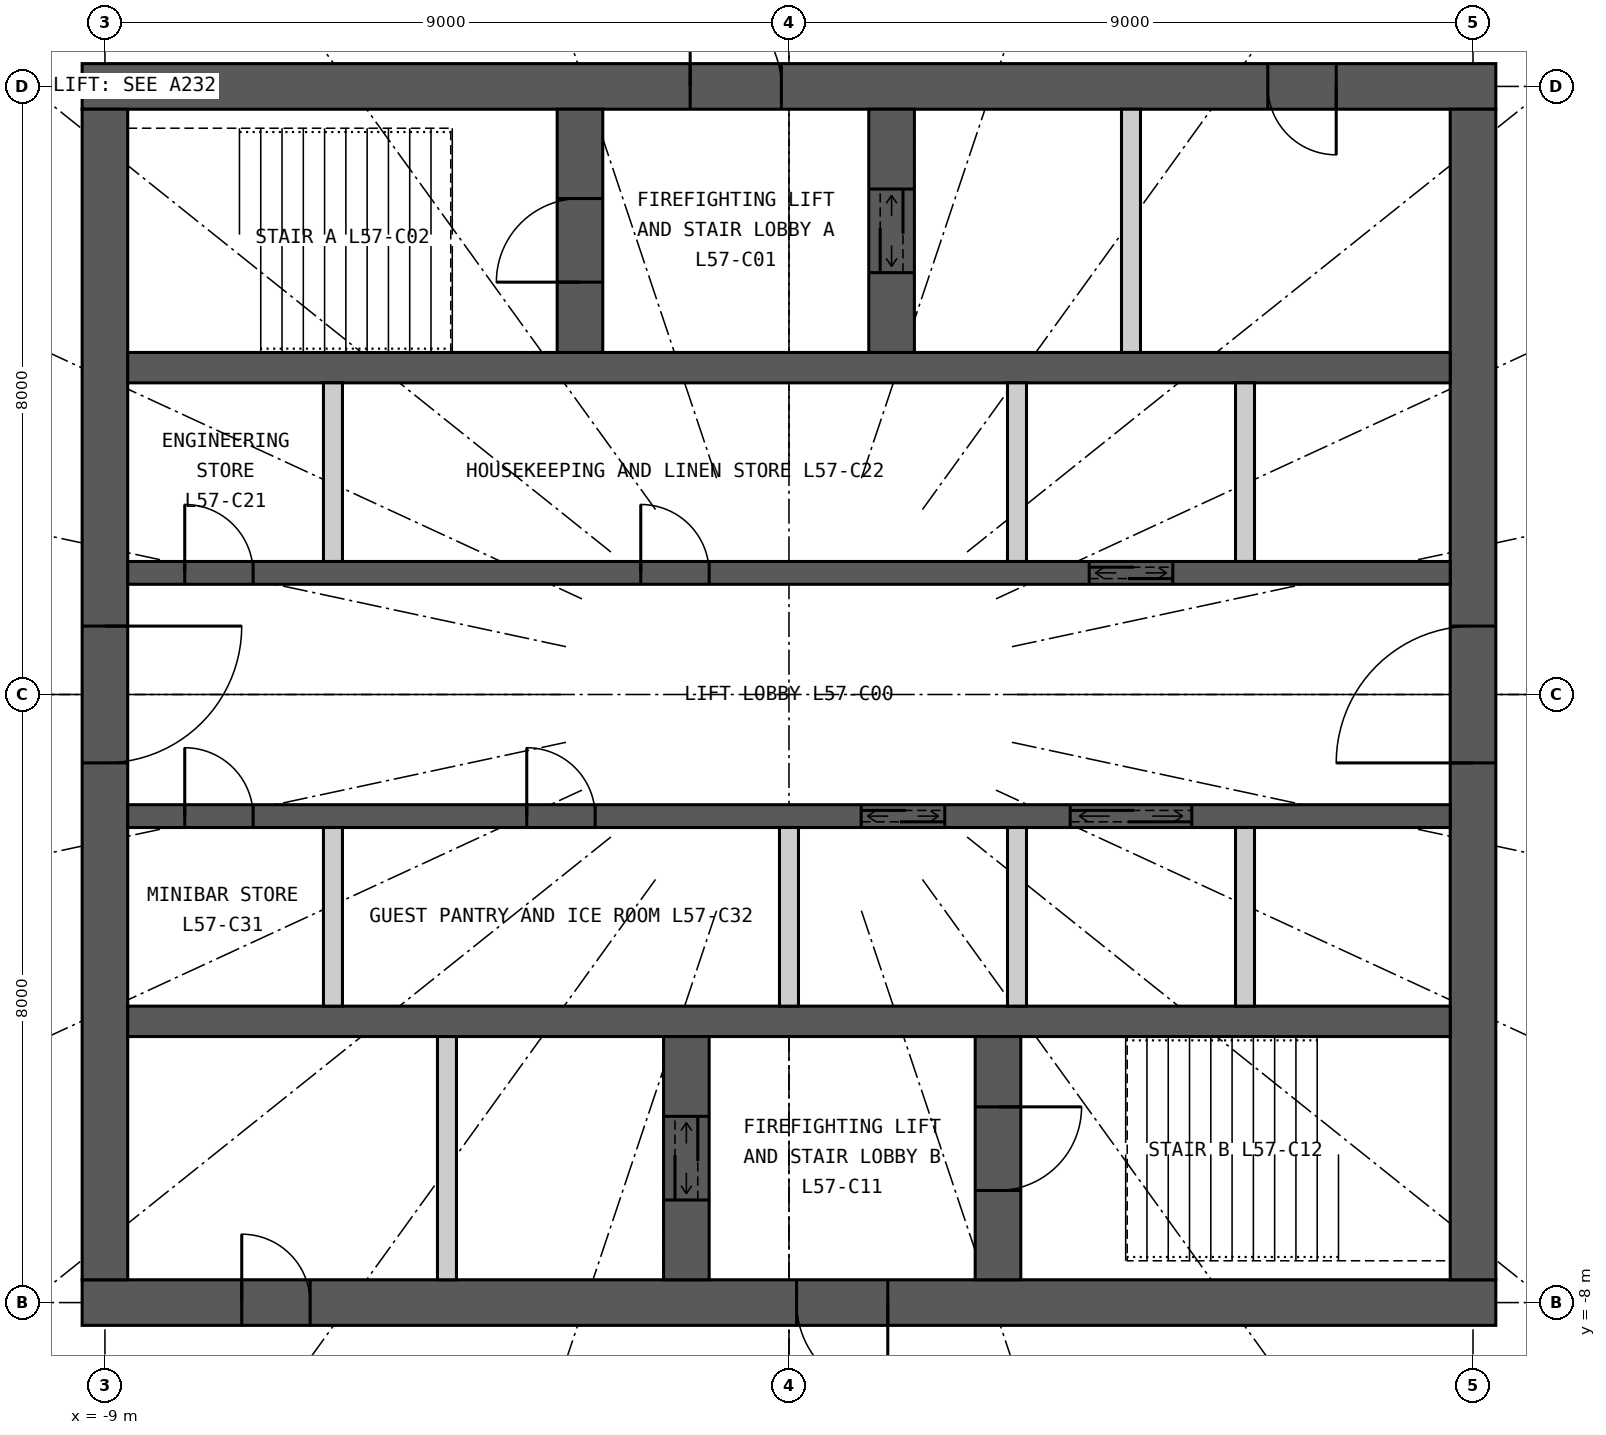
"""IFC4 building model, lengths in metres.
Left out: names, types, materials, properties, quantities, classifications, styles, units other than length and angle.
Written with IfcOpenShell. Run it as: python <this file> out.ifc"""

import sys

from ifc_helpers import new_model, si_unit, direction, frame, frame_2d, origin, place, context, subcontext, project, spatial, rectangle, extrude, element, fill, save


model = new_model("IFC4")
c1 = context("Model", 3, precision=1e-05, world=origin(), true_north=direction((0.0, 1.0)))
c2 = subcontext(c1, "Body", "Model", "MODEL_VIEW")
j1 = project(units=[si_unit("LENGTHUNIT", "METRE"), si_unit("PLANEANGLEUNIT", "RADIAN")], contexts=[c1])
p1 = place(None, origin())
s1 = spatial("IfcSite", under=j1, at=p1, CompositionType="ELEMENT")
p2 = place(p1, origin())
s2 = spatial("IfcBuilding", under=s1, at=p2, CompositionType="ELEMENT")
p3 = place(p2, frame((0.0, 0.0, 212.7)))
s3 = spatial("IfcBuildingStorey", under=s2, at=p3, CompositionType="ELEMENT", Elevation=212.7)
p4 = place(p3, frame((-9.3, 8.0, 0.0), z_axis=(0.0, 0.0, 1.0), x_axis=(1.0, 0.0, 0.0)))
e1 = element("IfcWall", 1, at=p4, inside=s3, PredefinedType="SHEAR", context=c2, shape_type="SweptSolid", body=[
    extrude(rectangle(XDim=18.6, YDim=0.6, at=frame_2d((9.3, 0.0))), origin(), (0.0, 0.0, 1.0), 3.3),
])
p5 = place(p4, frame((8.0, 0.0, 0.0)))
e2 = element("IfcOpeningElement", 2, at=p5, cuts=e1, PredefinedType="OPENING", context=c2, shape_type="SweptSolid", body=[
    extrude(rectangle(XDim=1.2, YDim=2.2, at=frame_2d((0.6, 1.1))), frame((0.0, 0.31, 0.0), z_axis=(0.0, -1.0, 0.0), x_axis=(1.0, 0.0, 0.0)), (0.0, 0.0, 1.0), 0.62),
])
p6 = place(p4, frame((15.6, 0.0, 0.0)))
e3 = element("IfcOpeningElement", 3, at=p6, cuts=e1, PredefinedType="OPENING", context=c2, shape_type="SweptSolid", body=[
    extrude(rectangle(XDim=0.9, YDim=2.2, at=frame_2d((0.45, 1.1))), frame((0.0, 0.31, 0.0), z_axis=(0.0, -1.0, 0.0), x_axis=(1.0, 0.0, 0.0)), (0.0, 0.0, 1.0), 0.62),
])
p7 = place(p3, frame((9.3, -8.0, 0.0), z_axis=(0.0, 0.0, 1.0), x_axis=(-1.0, 0.0, 0.0)))
e4 = element("IfcWall", 4, at=p7, inside=s3, PredefinedType="SHEAR", context=c2, shape_type="SweptSolid", body=[
    extrude(rectangle(XDim=18.6, YDim=0.6, at=frame_2d((9.3, 0.0))), origin(), (0.0, 0.0, 1.0), 3.3),
])
p8 = place(p7, frame((8.0, 0.0, 0.0)))
e5 = element("IfcOpeningElement", 5, at=p8, cuts=e4, PredefinedType="OPENING", context=c2, shape_type="SweptSolid", body=[
    extrude(rectangle(XDim=1.2, YDim=2.2, at=frame_2d((0.6, 1.1))), frame((0.0, 0.31, 0.0), z_axis=(0.0, -1.0, 0.0), x_axis=(1.0, 0.0, 0.0)), (0.0, 0.0, 1.0), 0.62),
])
p9 = place(p7, frame((15.6, 0.0, 0.0)))
e6 = element("IfcOpeningElement", 6, at=p9, cuts=e4, PredefinedType="OPENING", context=c2, shape_type="SweptSolid", body=[
    extrude(rectangle(XDim=0.9, YDim=2.2, at=frame_2d((0.45, 1.1))), frame((0.0, 0.31, 0.0), z_axis=(0.0, -1.0, 0.0), x_axis=(1.0, 0.0, 0.0)), (0.0, 0.0, 1.0), 0.62),
])
p10 = place(p3, frame((9.0, -7.7, 0.0), z_axis=(0.0, 0.0, 1.0), x_axis=(0.0, 1.0, 0.0)))
e7 = element("IfcWall", 7, at=p10, inside=s3, PredefinedType="SHEAR", context=c2, shape_type="SweptSolid", body=[
    extrude(rectangle(XDim=15.4, YDim=0.6, at=frame_2d((7.7, 0.0))), origin(), (0.0, 0.0, 1.0), 3.3),
])
p11 = place(p10, frame((6.8, 0.0, 0.0)))
e8 = element("IfcOpeningElement", 8, at=p11, cuts=e7, PredefinedType="OPENING", context=c2, shape_type="SweptSolid", body=[
    extrude(rectangle(XDim=1.8, YDim=2.2, at=frame_2d((0.9, 1.1))), frame((0.0, 0.31, 0.0), z_axis=(0.0, -1.0, 0.0), x_axis=(1.0, 0.0, 0.0)), (0.0, 0.0, 1.0), 0.62),
])
p12 = place(p3, frame((-9.0, 7.7, 0.0), z_axis=(0.0, 0.0, 1.0), x_axis=(0.0, -1.0, 0.0)))
e9 = element("IfcWall", 9, at=p12, inside=s3, PredefinedType="SHEAR", context=c2, shape_type="SweptSolid", body=[
    extrude(rectangle(XDim=15.4, YDim=0.6, at=frame_2d((7.7, 0.0))), origin(), (0.0, 0.0, 1.0), 3.3),
])
p13 = place(p12, frame((6.8, 0.0, 0.0)))
e10 = element("IfcOpeningElement", 10, at=p13, cuts=e9, PredefinedType="OPENING", context=c2, shape_type="SweptSolid", body=[
    extrude(rectangle(XDim=1.8, YDim=2.2, at=frame_2d((0.9, 1.1))), frame((0.0, 0.31, 0.0), z_axis=(0.0, -1.0, 0.0), x_axis=(1.0, 0.0, 0.0)), (0.0, 0.0, 1.0), 0.62),
])
p14 = place(p3, frame((-8.7, 4.3, 0.0), z_axis=(0.0, 0.0, 1.0), x_axis=(1.0, 0.0, 0.0)))
e11 = element("IfcWall", 11, at=p14, inside=s3, PredefinedType="SHEAR", context=c2, shape_type="SweptSolid", body=[
    extrude(rectangle(XDim=17.4, YDim=0.4, at=frame_2d((8.7, 0.0))), origin(), (0.0, 0.0, 1.0), 3.3),
])
p15 = place(p3, frame((-8.7, 1.6, 0.0), z_axis=(0.0, 0.0, 1.0), x_axis=(1.0, 0.0, 0.0)))
e12 = element("IfcWall", 12, at=p15, inside=s3, PredefinedType="SHEAR", context=c2, shape_type="SweptSolid", body=[
    extrude(rectangle(XDim=17.4, YDim=0.3, at=frame_2d((8.7, 0.0))), origin(), (0.0, 0.0, 1.0), 3.3),
])
p16 = place(p15, frame((12.65, 0.0, 0.0)))
e13 = element("IfcOpeningElement", 13, at=p16, cuts=e12, PredefinedType="OPENING", context=c2, shape_type="SweptSolid", body=[
    extrude(rectangle(XDim=1.1, YDim=2.2, at=frame_2d((0.55, 1.1))), frame((0.0, 0.16, 0.0), z_axis=(0.0, -1.0, 0.0), x_axis=(1.0, 0.0, 0.0)), (0.0, 0.0, 1.0), 0.32),
])
p17 = place(p15, frame((0.75, 0.0, 0.0)))
e14 = element("IfcOpeningElement", 14, at=p17, cuts=e12, PredefinedType="OPENING", context=c2, shape_type="SweptSolid", body=[
    extrude(rectangle(XDim=0.9, YDim=2.2, at=frame_2d((0.45, 1.1))), frame((0.0, 0.16, 0.0), z_axis=(0.0, -1.0, 0.0), x_axis=(1.0, 0.0, 0.0)), (0.0, 0.0, 1.0), 0.32),
])
p18 = place(p15, frame((6.75, 0.0, 0.0)))
e15 = element("IfcOpeningElement", 15, at=p18, cuts=e12, PredefinedType="OPENING", context=c2, shape_type="SweptSolid", body=[
    extrude(rectangle(XDim=0.9, YDim=2.2, at=frame_2d((0.45, 1.1))), frame((0.0, 0.16, 0.0), z_axis=(0.0, -1.0, 0.0), x_axis=(1.0, 0.0, 0.0)), (0.0, 0.0, 1.0), 0.32),
])
p19 = place(p3, frame((-8.7, -4.3, 0.0), z_axis=(0.0, 0.0, 1.0), x_axis=(1.0, 0.0, 0.0)))
e16 = element("IfcWall", 16, at=p19, inside=s3, PredefinedType="SHEAR", context=c2, shape_type="SweptSolid", body=[
    extrude(rectangle(XDim=17.4, YDim=0.4, at=frame_2d((8.7, 0.0))), origin(), (0.0, 0.0, 1.0), 3.3),
])
p20 = place(p3, frame((-8.7, -1.6, 0.0), z_axis=(0.0, 0.0, 1.0), x_axis=(1.0, 0.0, 0.0)))
e17 = element("IfcWall", 17, at=p20, inside=s3, PredefinedType="SHEAR", context=c2, shape_type="SweptSolid", body=[
    extrude(rectangle(XDim=17.4, YDim=0.3, at=frame_2d((8.7, 0.0))), origin(), (0.0, 0.0, 1.0), 3.3),
])
p21 = place(p20, frame((9.65, 0.0, 0.0)))
e18 = element("IfcOpeningElement", 18, at=p21, cuts=e17, PredefinedType="OPENING", context=c2, shape_type="SweptSolid", body=[
    extrude(rectangle(XDim=1.1, YDim=2.2, at=frame_2d((0.55, 1.1))), frame((0.0, 0.16, 0.0), z_axis=(0.0, -1.0, 0.0), x_axis=(1.0, 0.0, 0.0)), (0.0, 0.0, 1.0), 0.32),
])
p22 = place(p20, frame((12.4, 0.0, 0.0)))
e19 = element("IfcOpeningElement", 19, at=p22, cuts=e17, PredefinedType="OPENING", context=c2, shape_type="SweptSolid", body=[
    extrude(rectangle(XDim=1.6, YDim=2.4, at=frame_2d((0.8, 1.2))), frame((0.0, 0.16, 0.0), z_axis=(0.0, -1.0, 0.0), x_axis=(1.0, 0.0, 0.0)), (0.0, 0.0, 1.0), 0.32),
])
p23 = place(p20, frame((0.75, 0.0, 0.0)))
e20 = element("IfcOpeningElement", 20, at=p23, cuts=e17, PredefinedType="OPENING", context=c2, shape_type="SweptSolid", body=[
    extrude(rectangle(XDim=0.9, YDim=2.2, at=frame_2d((0.45, 1.1))), frame((0.0, 0.16, 0.0), z_axis=(0.0, -1.0, 0.0), x_axis=(1.0, 0.0, 0.0)), (0.0, 0.0, 1.0), 0.32),
])
p24 = place(p20, frame((5.25, 0.0, 0.0)))
e21 = element("IfcOpeningElement", 21, at=p24, cuts=e17, PredefinedType="OPENING", context=c2, shape_type="SweptSolid", body=[
    extrude(rectangle(XDim=0.9, YDim=2.2, at=frame_2d((0.45, 1.1))), frame((0.0, 0.16, 0.0), z_axis=(0.0, -1.0, 0.0), x_axis=(1.0, 0.0, 0.0)), (0.0, 0.0, 1.0), 0.32),
])
p25 = place(p3, frame((-2.75, 4.5, 0.0), z_axis=(0.0, 0.0, 1.0), x_axis=(0.0, 1.0, 0.0)))
e22 = element("IfcWall", 22, at=p25, inside=s3, PredefinedType="SHEAR", context=c2, shape_type="SweptSolid", body=[
    extrude(rectangle(XDim=3.2, YDim=0.6, at=frame_2d((1.6, 0.0))), origin(), (0.0, 0.0, 1.0), 3.3),
])
p26 = place(p25, frame((0.925, 0.0, 0.0)))
e23 = element("IfcOpeningElement", 23, at=p26, cuts=e22, PredefinedType="OPENING", context=c2, shape_type="SweptSolid", body=[
    extrude(rectangle(XDim=1.1, YDim=2.2, at=frame_2d((0.55, 1.1))), frame((0.0, 0.31, 0.0), z_axis=(0.0, -1.0, 0.0), x_axis=(1.0, 0.0, 0.0)), (0.0, 0.0, 1.0), 0.62),
])
p27 = place(p3, frame((1.35, 4.5, 0.0), z_axis=(0.0, 0.0, 1.0), x_axis=(0.0, 1.0, 0.0)))
e24 = element("IfcWall", 24, at=p27, inside=s3, PredefinedType="SHEAR", context=c2, shape_type="SweptSolid", body=[
    extrude(rectangle(XDim=3.2, YDim=0.6, at=frame_2d((1.6, 0.0))), origin(), (0.0, 0.0, 1.0), 3.3),
])
p28 = place(p27, frame((1.05, 0.0, 0.0)))
e25 = element("IfcOpeningElement", 25, at=p28, cuts=e24, PredefinedType="OPENING", context=c2, shape_type="SweptSolid", body=[
    extrude(rectangle(XDim=1.1, YDim=2.2, at=frame_2d((0.55, 1.1))), frame((0.0, 0.31, 0.0), z_axis=(0.0, -1.0, 0.0), x_axis=(1.0, 0.0, 0.0)), (0.0, 0.0, 1.0), 0.62),
])
p29 = place(p3, frame((4.5, 4.5, 0.0), z_axis=(0.0, 0.0, 1.0), x_axis=(0.0, 1.0, 0.0)))
e26 = element("IfcWall", 26, at=p29, inside=s3, PredefinedType="PARTITIONING", context=c2, shape_type="SweptSolid", body=[
    extrude(rectangle(XDim=3.2, YDim=0.25, at=frame_2d((1.6, 0.0))), origin(), (0.0, 0.0, 1.0), 3.3),
])
p30 = place(p3, frame((2.75, -7.7, 0.0), z_axis=(0.0, 0.0, 1.0), x_axis=(0.0, 1.0, 0.0)))
e27 = element("IfcWall", 27, at=p30, inside=s3, PredefinedType="SHEAR", context=c2, shape_type="SweptSolid", body=[
    extrude(rectangle(XDim=3.2, YDim=0.6, at=frame_2d((1.6, 0.0))), origin(), (0.0, 0.0, 1.0), 3.3),
])
p31 = place(p30, frame((1.175, 0.0, 0.0)))
e28 = element("IfcOpeningElement", 28, at=p31, cuts=e27, PredefinedType="OPENING", context=c2, shape_type="SweptSolid", body=[
    extrude(rectangle(XDim=1.1, YDim=2.2, at=frame_2d((0.55, 1.1))), frame((0.0, 0.31, 0.0), z_axis=(0.0, -1.0, 0.0), x_axis=(1.0, 0.0, 0.0)), (0.0, 0.0, 1.0), 0.62),
])
p32 = place(p3, frame((-1.35, -7.7, 0.0), z_axis=(0.0, 0.0, 1.0), x_axis=(0.0, 1.0, 0.0)))
e29 = element("IfcWall", 29, at=p32, inside=s3, PredefinedType="SHEAR", context=c2, shape_type="SweptSolid", body=[
    extrude(rectangle(XDim=3.2, YDim=0.6, at=frame_2d((1.6, 0.0))), origin(), (0.0, 0.0, 1.0), 3.3),
])
p33 = place(p32, frame((1.05, 0.0, 0.0)))
e30 = element("IfcOpeningElement", 30, at=p33, cuts=e29, PredefinedType="OPENING", context=c2, shape_type="SweptSolid", body=[
    extrude(rectangle(XDim=1.1, YDim=2.2, at=frame_2d((0.55, 1.1))), frame((0.0, 0.31, 0.0), z_axis=(0.0, -1.0, 0.0), x_axis=(1.0, 0.0, 0.0)), (0.0, 0.0, 1.0), 0.62),
])
p34 = place(p3, frame((-4.5, -7.7, 0.0), z_axis=(0.0, 0.0, 1.0), x_axis=(0.0, 1.0, 0.0)))
e31 = element("IfcWall", 31, at=p34, inside=s3, PredefinedType="PARTITIONING", context=c2, shape_type="SweptSolid", body=[
    extrude(rectangle(XDim=3.2, YDim=0.25, at=frame_2d((1.6, 0.0))), origin(), (0.0, 0.0, 1.0), 3.3),
])
for number, where, z_axis, x_axis in (
    (32, (-6.0, 1.75, 0.0), (0.0, 0.0, 1.0), (0.0, 1.0, 0.0)),
    (33, (3.0, 1.75, 0.0), (0.0, 0.0, 1.0), (0.0, 1.0, 0.0)),
    (34, (6.0, 1.75, 0.0), (0.0, 0.0, 1.0), (0.0, 1.0, 0.0)),
    (35, (-6.0, -4.1, 0.0), (0.0, 0.0, 1.0), (0.0, 1.0, 0.0)),
    (36, (0.0, -4.1, 0.0), (0.0, 0.0, 1.0), (0.0, 1.0, 0.0)),
    (37, (3.0, -4.1, 0.0), (0.0, 0.0, 1.0), (0.0, 1.0, 0.0)),
    (38, (6.0, -4.1, 0.0), (0.0, 0.0, 1.0), (0.0, 1.0, 0.0)),
):
    element("IfcWall", number, at=place(p3, frame(where, z_axis=z_axis, x_axis=x_axis)), inside=s3, PredefinedType="PARTITIONING", context=c2, shape_type="SweptSolid", body=[
        extrude(rectangle(XDim=2.35, YDim=0.25, at=frame_2d((1.175, 0.0))), origin(), (0.0, 0.0, 1.0), 3.3),
    ])
p35 = place(p5, origin())
e39 = element("IfcDoor", 39, at=p35, inside=s3, OperationType="SINGLE_SWING_LEFT", PredefinedType="DOOR", context=c2, shape_type="SweptSolid", body=[
    extrude(rectangle(XDim=1.2, YDim=2.2, at=frame_2d((0.6, 1.1))), frame((0.0, 0.025, 0.0), z_axis=(0.0, -1.0, 0.0), x_axis=(1.0, 0.0, 0.0)), (0.0, 0.0, 1.0), 0.05),
])
fill(e2, e39)
p36 = place(p26, origin())
e40 = element("IfcDoor", 40, at=p36, inside=s3, OperationType="SINGLE_SWING_LEFT", PredefinedType="DOOR", context=c2, shape_type="SweptSolid", body=[
    extrude(rectangle(XDim=1.1, YDim=2.2, at=frame_2d((0.55, 1.1))), frame((0.0, 0.025, 0.0), z_axis=(0.0, -1.0, 0.0), x_axis=(1.0, 0.0, 0.0)), (0.0, 0.0, 1.0), 0.05),
])
fill(e23, e40)
p37 = place(p28, origin())
e41 = element("IfcDoor", 41, at=p37, inside=s3, OperationType="DOUBLE_DOOR_SLIDING", PredefinedType="DOOR", context=c2, shape_type="SweptSolid", body=[
    extrude(rectangle(XDim=1.1, YDim=2.2, at=frame_2d((0.55, 1.1))), frame((0.0, 0.025, 0.0), z_axis=(0.0, -1.0, 0.0), x_axis=(1.0, 0.0, 0.0)), (0.0, 0.0, 1.0), 0.05),
])
fill(e25, e41)
p38 = place(p6, origin())
e42 = element("IfcDoor", 42, at=p38, inside=s3, OperationType="SINGLE_SWING_RIGHT", PredefinedType="DOOR", context=c2, shape_type="SweptSolid", body=[
    extrude(rectangle(XDim=0.9, YDim=2.2, at=frame_2d((0.45, 1.1))), frame((0.0, 0.025, 0.0), z_axis=(0.0, -1.0, 0.0), x_axis=(1.0, 0.0, 0.0)), (0.0, 0.0, 1.0), 0.05),
])
fill(e3, e42)
p39 = place(p8, origin())
e43 = element("IfcDoor", 43, at=p39, inside=s3, OperationType="SINGLE_SWING_LEFT", PredefinedType="DOOR", context=c2, shape_type="SweptSolid", body=[
    extrude(rectangle(XDim=1.2, YDim=2.2, at=frame_2d((0.6, 1.1))), frame((0.0, 0.025, 0.0), z_axis=(0.0, -1.0, 0.0), x_axis=(1.0, 0.0, 0.0)), (0.0, 0.0, 1.0), 0.05),
])
fill(e5, e43)
p40 = place(p31, origin())
e44 = element("IfcDoor", 44, at=p40, inside=s3, OperationType="SINGLE_SWING_RIGHT", PredefinedType="DOOR", context=c2, shape_type="SweptSolid", body=[
    extrude(rectangle(XDim=1.1, YDim=2.2, at=frame_2d((0.55, 1.1))), frame((0.0, 0.025, 0.0), z_axis=(0.0, -1.0, 0.0), x_axis=(1.0, 0.0, 0.0)), (0.0, 0.0, 1.0), 0.05),
])
fill(e28, e44)
p41 = place(p33, origin())
e45 = element("IfcDoor", 45, at=p41, inside=s3, OperationType="DOUBLE_DOOR_SLIDING", PredefinedType="DOOR", context=c2, shape_type="SweptSolid", body=[
    extrude(rectangle(XDim=1.1, YDim=2.2, at=frame_2d((0.55, 1.1))), frame((0.0, 0.025, 0.0), z_axis=(0.0, -1.0, 0.0), x_axis=(1.0, 0.0, 0.0)), (0.0, 0.0, 1.0), 0.05),
])
fill(e30, e45)
p42 = place(p9, origin())
e46 = element("IfcDoor", 46, at=p42, inside=s3, OperationType="SINGLE_SWING_RIGHT", PredefinedType="DOOR", context=c2, shape_type="SweptSolid", body=[
    extrude(rectangle(XDim=0.9, YDim=2.2, at=frame_2d((0.45, 1.1))), frame((0.0, 0.025, 0.0), z_axis=(0.0, -1.0, 0.0), x_axis=(1.0, 0.0, 0.0)), (0.0, 0.0, 1.0), 0.05),
])
fill(e6, e46)
p43 = place(p16, origin())
e47 = element("IfcDoor", 47, at=p43, inside=s3, OperationType="DOUBLE_DOOR_SLIDING", PredefinedType="DOOR", context=c2, shape_type="SweptSolid", body=[
    extrude(rectangle(XDim=1.1, YDim=2.2, at=frame_2d((0.55, 1.1))), frame((0.0, 0.025, 0.0), z_axis=(0.0, -1.0, 0.0), x_axis=(1.0, 0.0, 0.0)), (0.0, 0.0, 1.0), 0.05),
])
fill(e13, e47)
p44 = place(p21, origin())
e48 = element("IfcDoor", 48, at=p44, inside=s3, OperationType="DOUBLE_DOOR_SLIDING", PredefinedType="DOOR", context=c2, shape_type="SweptSolid", body=[
    extrude(rectangle(XDim=1.1, YDim=2.2, at=frame_2d((0.55, 1.1))), frame((0.0, 0.025, 0.0), z_axis=(0.0, -1.0, 0.0), x_axis=(1.0, 0.0, 0.0)), (0.0, 0.0, 1.0), 0.05),
])
fill(e18, e48)
p45 = place(p22, origin())
e49 = element("IfcDoor", 49, at=p45, inside=s3, OperationType="DOUBLE_DOOR_SLIDING", PredefinedType="DOOR", context=c2, shape_type="SweptSolid", body=[
    extrude(rectangle(XDim=1.6, YDim=2.4, at=frame_2d((0.8, 1.2))), frame((0.0, 0.025, 0.0), z_axis=(0.0, -1.0, 0.0), x_axis=(1.0, 0.0, 0.0)), (0.0, 0.0, 1.0), 0.05),
])
fill(e19, e49)
p46 = place(p17, origin())
e50 = element("IfcDoor", 50, at=p46, inside=s3, OperationType="SINGLE_SWING_LEFT", PredefinedType="DOOR", context=c2, shape_type="SweptSolid", body=[
    extrude(rectangle(XDim=0.9, YDim=2.2, at=frame_2d((0.45, 1.1))), frame((0.0, 0.025, 0.0), z_axis=(0.0, -1.0, 0.0), x_axis=(1.0, 0.0, 0.0)), (0.0, 0.0, 1.0), 0.05),
])
fill(e14, e50)
p47 = place(p18, origin())
e51 = element("IfcDoor", 51, at=p47, inside=s3, OperationType="SINGLE_SWING_LEFT", PredefinedType="DOOR", context=c2, shape_type="SweptSolid", body=[
    extrude(rectangle(XDim=0.9, YDim=2.2, at=frame_2d((0.45, 1.1))), frame((0.0, 0.025, 0.0), z_axis=(0.0, -1.0, 0.0), x_axis=(1.0, 0.0, 0.0)), (0.0, 0.0, 1.0), 0.05),
])
fill(e15, e51)
p48 = place(p23, origin())
e52 = element("IfcDoor", 52, at=p48, inside=s3, OperationType="SINGLE_SWING_LEFT", PredefinedType="DOOR", context=c2, shape_type="SweptSolid", body=[
    extrude(rectangle(XDim=0.9, YDim=2.2, at=frame_2d((0.45, 1.1))), frame((0.0, 0.025, 0.0), z_axis=(0.0, -1.0, 0.0), x_axis=(1.0, 0.0, 0.0)), (0.0, 0.0, 1.0), 0.05),
])
fill(e20, e52)
p49 = place(p24, origin())
e53 = element("IfcDoor", 53, at=p49, inside=s3, OperationType="SINGLE_SWING_LEFT", PredefinedType="DOOR", context=c2, shape_type="SweptSolid", body=[
    extrude(rectangle(XDim=0.9, YDim=2.2, at=frame_2d((0.45, 1.1))), frame((0.0, 0.025, 0.0), z_axis=(0.0, -1.0, 0.0), x_axis=(1.0, 0.0, 0.0)), (0.0, 0.0, 1.0), 0.05),
])
fill(e21, e53)
p50 = place(p11, origin())
e54 = element("IfcDoor", 54, at=p50, inside=s3, OperationType="DOUBLE_DOOR_DOUBLE_SWING", PredefinedType="DOOR", context=c2, shape_type="SweptSolid", body=[
    extrude(rectangle(XDim=1.8, YDim=2.2, at=frame_2d((0.9, 1.1))), frame((0.0, 0.025, 0.0), z_axis=(0.0, -1.0, 0.0), x_axis=(1.0, 0.0, 0.0)), (0.0, 0.0, 1.0), 0.05),
])
fill(e8, e54)
p51 = place(p13, origin())
e55 = element("IfcDoor", 55, at=p51, inside=s3, OperationType="DOUBLE_DOOR_DOUBLE_SWING", PredefinedType="DOOR", context=c2, shape_type="SweptSolid", body=[
    extrude(rectangle(XDim=1.8, YDim=2.2, at=frame_2d((0.9, 1.1))), frame((0.0, 0.025, 0.0), z_axis=(0.0, -1.0, 0.0), x_axis=(1.0, 0.0, 0.0)), (0.0, 0.0, 1.0), 0.05),
])
fill(e10, e55)
save(model, sys.argv[1])
